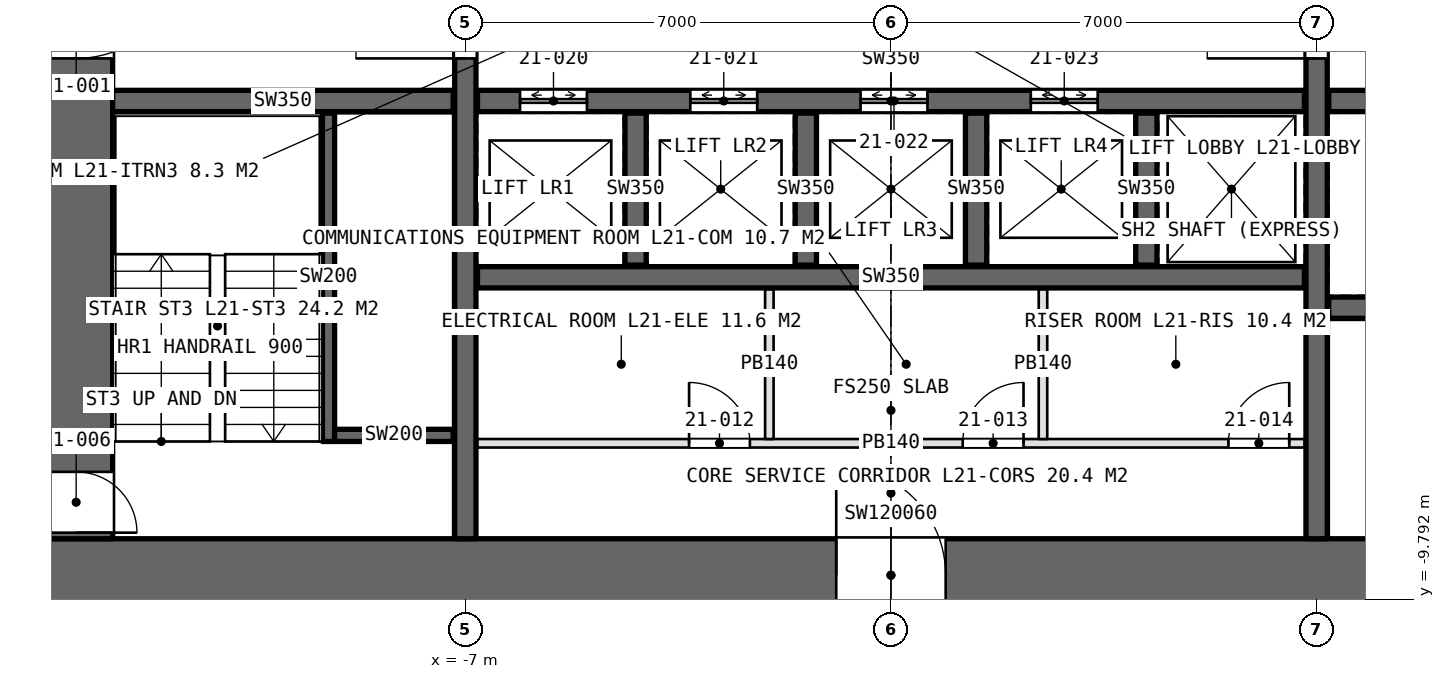
"""IFC4 building model, lengths in metres.
Left out: names, types, materials, properties, quantities, classifications, styles, units other than length and angle.
Written with IfcOpenShell. Run it as: python <this file> out.ifc"""

import sys

from ifc_helpers import new_model, si_unit, direction, frame, frame_2d, origin, place, context, subcontext, project, spatial, rectangle, extrude, element, fill, save


model = new_model("IFC4")
c1 = context("Model", 3, precision=1e-05, world=origin(), true_north=direction((0.0, 1.0)))
c2 = subcontext(c1, "Body", "Model", "MODEL_VIEW")
j1 = project(units=[si_unit("LENGTHUNIT", "METRE"), si_unit("PLANEANGLEUNIT", "RADIAN")], contexts=[c1])
p1 = place(None, origin())
s1 = spatial("IfcSite", under=j1, at=p1, CompositionType="ELEMENT")
p2 = place(p1, origin())
s2 = spatial("IfcBuilding", under=s1, at=p2, CompositionType="ELEMENT")
p3 = place(p2, frame((0.0, 0.0, 105.0)))
s3 = spatial("IfcBuildingStorey", under=s2, at=p3, CompositionType="ELEMENT", Elevation=105.0)
p4 = place(p3, frame((-14.0, -9.4, 0.0), z_axis=(0.0, 0.0, 1.0), x_axis=(1.0, 0.0, 0.0)))
e1 = element("IfcWall", 1, at=p4, inside=s3, PredefinedType="SHEAR", context=c2, shape_type="SweptSolid", body=[
    extrude(rectangle(XDim=28.0, YDim=1.2, at=frame_2d((14.0, 0.0))), origin(), (0.0, 0.0, 1.0), 4.2),
])
p5 = place(p4, frame((13.1, 0.0, 0.0)))
e2 = element("IfcOpeningElement", 2, at=p5, cuts=e1, PredefinedType="OPENING", context=c2, shape_type="SweptSolid", body=[
    extrude(rectangle(XDim=1.8, YDim=2.4, at=frame_2d((0.9, 1.2))), frame((0.0, 0.61, 0.0), z_axis=(0.0, -1.0, 0.0), x_axis=(1.0, 0.0, 0.0)), (0.0, 0.0, 1.0), 1.22),
])
p6 = place(p4, frame((22.9, 0.0, 0.0)))
e3 = element("IfcOpeningElement", 3, at=p6, cuts=e1, PredefinedType="OPENING", context=c2, shape_type="SweptSolid", body=[
    extrude(rectangle(XDim=2.2, YDim=2.7, at=frame_2d((1.1, 1.35))), frame((0.0, 0.61, 0.0), z_axis=(0.0, -1.0, 0.0), x_axis=(1.0, 0.0, 0.0)), (0.0, 0.0, 1.0), 1.22),
])
p7 = place(p3, frame((-13.4, 8.8, 0.0), z_axis=(0.0, 0.0, 1.0), x_axis=(0.0, -1.0, 0.0)))
e4 = element("IfcWall", 4, at=p7, inside=s3, PredefinedType="SHEAR", context=c2, shape_type="SweptSolid", body=[
    extrude(rectangle(XDim=17.6, YDim=1.2, at=frame_2d((8.8, 0.0))), origin(), (0.0, 0.0, 1.0), 4.2),
])
p8 = place(p7, frame((7.9, 0.0, 0.0)))
e5 = element("IfcOpeningElement", 5, at=p8, cuts=e4, PredefinedType="OPENING", context=c2, shape_type="SweptSolid", body=[
    extrude(rectangle(XDim=1.8, YDim=2.4, at=frame_2d((0.9, 1.2))), frame((0.0, 0.61, 0.0), z_axis=(0.0, -1.0, 0.0), x_axis=(1.0, 0.0, 0.0)), (0.0, 0.0, 1.0), 1.22),
])
p9 = place(p7, frame((16.5, 0.0, 0.0)))
e6 = element("IfcOpeningElement", 6, at=p9, cuts=e4, PredefinedType="OPENING", context=c2, shape_type="SweptSolid", body=[
    extrude(rectangle(XDim=1.0, YDim=2.4, at=frame_2d((0.5, 1.2))), frame((0.0, 0.61, 0.0), z_axis=(0.0, -1.0, 0.0), x_axis=(1.0, 0.0, 0.0)), (0.0, 0.0, 1.0), 1.22),
])
p10 = place(p3, frame((-7.0, -8.8, 0.0), z_axis=(0.0, 0.0, 1.0), x_axis=(0.0, 1.0, 0.0)))
e7 = element("IfcWall", 7, at=p10, inside=s3, PredefinedType="SHEAR", context=c2, shape_type="SweptSolid", body=[
    extrude(rectangle(XDim=17.6, YDim=0.35, at=frame_2d((8.8, 0.0))), origin(), (0.0, 0.0, 1.0), 4.2),
])
p11 = place(p10, frame((7.9, 0.0, 0.0)))
e8 = element("IfcOpeningElement", 8, at=p11, cuts=e7, PredefinedType="OPENING", context=c2, shape_type="SweptSolid", body=[
    extrude(rectangle(XDim=1.8, YDim=2.4, at=frame_2d((0.9, 1.2))), frame((0.0, 0.185, 0.0), z_axis=(0.0, -1.0, 0.0), x_axis=(1.0, 0.0, 0.0)), (0.0, 0.0, 1.0), 0.37),
])
p12 = place(p3, frame((7.0, -8.8, 0.0), z_axis=(0.0, 0.0, 1.0), x_axis=(0.0, 1.0, 0.0)))
e9 = element("IfcWall", 9, at=p12, inside=s3, PredefinedType="SHEAR", context=c2, shape_type="SweptSolid", body=[
    extrude(rectangle(XDim=17.6, YDim=0.35, at=frame_2d((8.8, 0.0))), origin(), (0.0, 0.0, 1.0), 4.2),
])
p13 = place(p12, frame((7.9, 0.0, 0.0)))
e10 = element("IfcOpeningElement", 10, at=p13, cuts=e9, PredefinedType="OPENING", context=c2, shape_type="SweptSolid", body=[
    extrude(rectangle(XDim=1.8, YDim=2.4, at=frame_2d((0.9, 1.2))), frame((0.0, 0.185, 0.0), z_axis=(0.0, -1.0, 0.0), x_axis=(1.0, 0.0, 0.0)), (0.0, 0.0, 1.0), 0.37),
])
p14 = place(p3, frame((-6.8, -1.6, 0.0), z_axis=(0.0, 0.0, 1.0), x_axis=(1.0, 0.0, 0.0)))
e11 = element("IfcWall", 11, at=p14, inside=s3, PredefinedType="SHEAR", context=c2, shape_type="SweptSolid", body=[
    extrude(rectangle(XDim=13.6, YDim=0.35, at=frame_2d((6.8, 0.0))), origin(), (0.0, 0.0, 1.0), 4.2),
])
p15 = place(p14, frame((0.7, 0.0, 0.0)))
e12 = element("IfcOpeningElement", 12, at=p15, cuts=e11, PredefinedType="OPENING", context=c2, shape_type="SweptSolid", body=[
    extrude(rectangle(XDim=1.1, YDim=2.4, at=frame_2d((0.55, 1.2))), frame((0.0, 0.185, 0.0), z_axis=(0.0, -1.0, 0.0), x_axis=(1.0, 0.0, 0.0)), (0.0, 0.0, 1.0), 0.37),
])
p16 = place(p14, frame((3.5, 0.0, 0.0)))
e13 = element("IfcOpeningElement", 13, at=p16, cuts=e11, PredefinedType="OPENING", context=c2, shape_type="SweptSolid", body=[
    extrude(rectangle(XDim=1.1, YDim=2.4, at=frame_2d((0.55, 1.2))), frame((0.0, 0.185, 0.0), z_axis=(0.0, -1.0, 0.0), x_axis=(1.0, 0.0, 0.0)), (0.0, 0.0, 1.0), 0.37),
])
p17 = place(p14, frame((6.3, 0.0, 0.0)))
e14 = element("IfcOpeningElement", 14, at=p17, cuts=e11, PredefinedType="OPENING", context=c2, shape_type="SweptSolid", body=[
    extrude(rectangle(XDim=1.1, YDim=2.4, at=frame_2d((0.55, 1.2))), frame((0.0, 0.185, 0.0), z_axis=(0.0, -1.0, 0.0), x_axis=(1.0, 0.0, 0.0)), (0.0, 0.0, 1.0), 0.37),
])
p18 = place(p14, frame((9.1, 0.0, 0.0)))
e15 = element("IfcOpeningElement", 15, at=p18, cuts=e11, PredefinedType="OPENING", context=c2, shape_type="SweptSolid", body=[
    extrude(rectangle(XDim=1.1, YDim=2.4, at=frame_2d((0.55, 1.2))), frame((0.0, 0.185, 0.0), z_axis=(0.0, -1.0, 0.0), x_axis=(1.0, 0.0, 0.0)), (0.0, 0.0, 1.0), 0.37),
])
p19 = place(p3, frame((-6.8, -4.5, 0.0), z_axis=(0.0, 0.0, 1.0), x_axis=(1.0, 0.0, 0.0)))
e16 = element("IfcWall", 16, at=p19, inside=s3, PredefinedType="SHEAR", context=c2, shape_type="SweptSolid", body=[
    extrude(rectangle(XDim=13.6, YDim=0.35, at=frame_2d((6.8, 0.0))), origin(), (0.0, 0.0, 1.0), 4.2),
])
p20 = place(p3, frame((-12.8, -1.6, 0.0), z_axis=(0.0, 0.0, 1.0), x_axis=(1.0, 0.0, 0.0)))
e17 = element("IfcWall", 17, at=p20, inside=s3, PredefinedType="SHEAR", context=c2, shape_type="SweptSolid", body=[
    extrude(rectangle(XDim=5.6, YDim=0.35, at=frame_2d((2.8, 0.0))), origin(), (0.0, 0.0, 1.0), 4.2),
])
p21 = place(p3, frame((7.2, -1.6, 0.0), z_axis=(0.0, 0.0, 1.0), x_axis=(1.0, 0.0, 0.0)))
e18 = element("IfcWall", 18, at=p21, inside=s3, PredefinedType="SHEAR", context=c2, shape_type="SweptSolid", body=[
    extrude(rectangle(XDim=5.6, YDim=0.35, at=frame_2d((2.8, 0.0))), origin(), (0.0, 0.0, 1.0), 4.2),
])
p22 = place(p21, frame((0.9, 0.0, 0.0)))
e19 = element("IfcOpeningElement", 19, at=p22, cuts=e18, PredefinedType="OPENING", context=c2, shape_type="SweptSolid", body=[
    extrude(rectangle(XDim=1.3, YDim=2.4, at=frame_2d((0.65, 1.2))), frame((0.0, 0.185, 0.0), z_axis=(0.0, -1.0, 0.0), x_axis=(1.0, 0.0, 0.0)), (0.0, 0.0, 1.0), 0.37),
])
p23 = place(p21, frame((3.9, 0.0, 0.0)))
e20 = element("IfcOpeningElement", 20, at=p23, cuts=e18, PredefinedType="OPENING", context=c2, shape_type="SweptSolid", body=[
    extrude(rectangle(XDim=1.3, YDim=2.4, at=frame_2d((0.65, 1.2))), frame((0.0, 0.185, 0.0), z_axis=(0.0, -1.0, 0.0), x_axis=(1.0, 0.0, 0.0)), (0.0, 0.0, 1.0), 0.37),
])
p24 = place(p3, frame((7.2, -5.0, 0.0), z_axis=(0.0, 0.0, 1.0), x_axis=(1.0, 0.0, 0.0)))
e21 = element("IfcWall", 21, at=p24, inside=s3, PredefinedType="SHEAR", context=c2, shape_type="SweptSolid", body=[
    extrude(rectangle(XDim=5.6, YDim=0.35, at=frame_2d((2.8, 0.0))), origin(), (0.0, 0.0, 1.0), 4.2),
])
for number, where, z_axis, x_axis in (
    (22, (-4.2, -4.3, 0.0), (0.0, 0.0, 1.0), (0.0, 1.0, 0.0)),
    (23, (-1.4, -4.3, 0.0), (0.0, 0.0, 1.0), (0.0, 1.0, 0.0)),
    (24, (1.4, -4.3, 0.0), (0.0, 0.0, 1.0), (0.0, 1.0, 0.0)),
    (25, (4.2, -4.3, 0.0), (0.0, 0.0, 1.0), (0.0, 1.0, 0.0)),
):
    element("IfcWall", number, at=place(p3, frame(where, z_axis=z_axis, x_axis=x_axis)), inside=s3, PredefinedType="SHEAR", context=c2, shape_type="SweptSolid", body=[
        extrude(rectangle(XDim=2.5, YDim=0.35, at=frame_2d((1.25, 0.0))), origin(), (0.0, 0.0, 1.0), 4.2),
    ])
p25 = place(p3, frame((-6.8, -7.23, 0.0), z_axis=(0.0, 0.0, 1.0), x_axis=(1.0, 0.0, 0.0)))
e26 = element("IfcWall", 26, at=p25, inside=s3, PredefinedType="PARTITIONING", context=c2, shape_type="SweptSolid", body=[
    extrude(rectangle(XDim=13.6, YDim=0.14, at=frame_2d((6.8, 0.0))), origin(), (0.0, 0.0, 1.0), 3.95),
])
p26 = place(p25, frame((3.48, 0.0, 0.0)))
e27 = element("IfcOpeningElement", 27, at=p26, cuts=e26, PredefinedType="OPENING", context=c2, shape_type="SweptSolid", body=[
    extrude(rectangle(XDim=1.0, YDim=2.4, at=frame_2d((0.5, 1.2))), frame((0.0, 0.08, 0.0), z_axis=(0.0, -1.0, 0.0), x_axis=(1.0, 0.0, 0.0)), (0.0, 0.0, 1.0), 0.16),
])
p27 = place(p25, frame((7.98, 0.0, 0.0)))
e28 = element("IfcOpeningElement", 28, at=p27, cuts=e26, PredefinedType="OPENING", context=c2, shape_type="SweptSolid", body=[
    extrude(rectangle(XDim=1.0, YDim=2.4, at=frame_2d((0.5, 1.2))), frame((0.0, 0.08, 0.0), z_axis=(0.0, -1.0, 0.0), x_axis=(1.0, 0.0, 0.0)), (0.0, 0.0, 1.0), 0.16),
])
p28 = place(p25, frame((12.35, 0.0, 0.0)))
e29 = element("IfcOpeningElement", 29, at=p28, cuts=e26, PredefinedType="OPENING", context=c2, shape_type="SweptSolid", body=[
    extrude(rectangle(XDim=1.0, YDim=2.4, at=frame_2d((0.5, 1.2))), frame((0.0, 0.08, 0.0), z_axis=(0.0, -1.0, 0.0), x_axis=(1.0, 0.0, 0.0)), (0.0, 0.0, 1.0), 0.16),
])
for number, where, z_axis, x_axis in (
    (30, (-2.0, -4.7, 0.0), (0.0, 0.0, 1.0), (0.0, -1.0, 0.0)),
    (31, (2.5, -4.7, 0.0), (0.0, 0.0, 1.0), (0.0, -1.0, 0.0)),
):
    element("IfcWall", number, at=place(p3, frame(where, z_axis=z_axis, x_axis=x_axis)), inside=s3, PredefinedType="PARTITIONING", context=c2, shape_type="SweptSolid", body=[
        extrude(rectangle(XDim=2.46, YDim=0.14, at=frame_2d((1.23, 0.0))), origin(), (0.0, 0.0, 1.0), 3.95),
    ])
p29 = place(p3, frame((-9.25, -7.2, 0.0), z_axis=(0.0, 0.0, 1.0), x_axis=(0.0, 1.0, 0.0)))
e32 = element("IfcWall", 32, at=p29, inside=s3, PredefinedType="SOLIDWALL", context=c2, shape_type="SweptSolid", body=[
    extrude(rectangle(XDim=5.4, YDim=0.2, at=frame_2d((2.7, 0.0))), origin(), (0.0, 0.0, 1.0), 4.2),
])
p30 = place(p3, frame((-9.15, -7.1, 0.0), z_axis=(0.0, 0.0, 1.0), x_axis=(1.0, 0.0, 0.0)))
e33 = element("IfcWall", 33, at=p30, inside=s3, PredefinedType="SOLIDWALL", context=c2, shape_type="SweptSolid", body=[
    extrude(rectangle(XDim=1.95, YDim=0.2, at=frame_2d((0.975, 0.0))), origin(), (0.0, 0.0, 1.0), 4.2),
])
p31 = place(p8, origin())
e34 = element("IfcDoor", 34, at=p31, inside=s3, OperationType="DOUBLE_DOOR_SINGLE_SWING", PredefinedType="DOOR", context=c2, shape_type="SweptSolid", body=[
    extrude(rectangle(XDim=1.8, YDim=2.4, at=frame_2d((0.9, 1.2))), frame((0.0, 0.025, 0.0), z_axis=(0.0, -1.0, 0.0), x_axis=(1.0, 0.0, 0.0)), (0.0, 0.0, 1.0), 0.05),
])
fill(e5, e34)
p32 = place(p11, origin())
e35 = element("IfcDoor", 35, at=p32, inside=s3, OperationType="DOUBLE_DOOR_SINGLE_SWING", PredefinedType="DOOR", context=c2, shape_type="SweptSolid", body=[
    extrude(rectangle(XDim=1.8, YDim=2.4, at=frame_2d((0.9, 1.2))), frame((0.0, 0.025, 0.0), z_axis=(0.0, -1.0, 0.0), x_axis=(1.0, 0.0, 0.0)), (0.0, 0.0, 1.0), 0.05),
])
fill(e8, e35)
p33 = place(p13, origin())
e36 = element("IfcDoor", 36, at=p33, inside=s3, OperationType="DOUBLE_DOOR_SINGLE_SWING", PredefinedType="DOOR", context=c2, shape_type="SweptSolid", body=[
    extrude(rectangle(XDim=1.8, YDim=2.4, at=frame_2d((0.9, 1.2))), frame((0.0, 0.025, 0.0), z_axis=(0.0, -1.0, 0.0), x_axis=(1.0, 0.0, 0.0)), (0.0, 0.0, 1.0), 0.05),
])
fill(e10, e36)
p34 = place(p9, origin())
e37 = element("IfcDoor", 37, at=p34, inside=s3, OperationType="SINGLE_SWING_RIGHT", PredefinedType="DOOR", context=c2, shape_type="SweptSolid", body=[
    extrude(rectangle(XDim=1.0, YDim=2.4, at=frame_2d((0.5, 1.2))), frame((0.0, 0.025, 0.0), z_axis=(0.0, -1.0, 0.0), x_axis=(1.0, 0.0, 0.0)), (0.0, 0.0, 1.0), 0.05),
])
fill(e6, e37)
p35 = place(p26, origin())
e38 = element("IfcDoor", 38, at=p35, inside=s3, OperationType="SINGLE_SWING_LEFT", PredefinedType="DOOR", context=c2, shape_type="SweptSolid", body=[
    extrude(rectangle(XDim=1.0, YDim=2.4, at=frame_2d((0.5, 1.2))), frame((0.0, 0.025, 0.0), z_axis=(0.0, -1.0, 0.0), x_axis=(1.0, 0.0, 0.0)), (0.0, 0.0, 1.0), 0.05),
])
fill(e27, e38)
p36 = place(p27, origin())
e39 = element("IfcDoor", 39, at=p36, inside=s3, OperationType="SINGLE_SWING_RIGHT", PredefinedType="DOOR", context=c2, shape_type="SweptSolid", body=[
    extrude(rectangle(XDim=1.0, YDim=2.4, at=frame_2d((0.5, 1.2))), frame((0.0, 0.025, 0.0), z_axis=(0.0, -1.0, 0.0), x_axis=(1.0, 0.0, 0.0)), (0.0, 0.0, 1.0), 0.05),
])
fill(e28, e39)
p37 = place(p28, origin())
e40 = element("IfcDoor", 40, at=p37, inside=s3, OperationType="SINGLE_SWING_RIGHT", PredefinedType="DOOR", context=c2, shape_type="SweptSolid", body=[
    extrude(rectangle(XDim=1.0, YDim=2.4, at=frame_2d((0.5, 1.2))), frame((0.0, 0.025, 0.0), z_axis=(0.0, -1.0, 0.0), x_axis=(1.0, 0.0, 0.0)), (0.0, 0.0, 1.0), 0.05),
])
fill(e29, e40)
p38 = place(p5, origin())
e41 = element("IfcDoor", 41, at=p38, inside=s3, OperationType="DOUBLE_DOOR_SINGLE_SWING", PredefinedType="DOOR", context=c2, shape_type="SweptSolid", body=[
    extrude(rectangle(XDim=1.8, YDim=2.4, at=frame_2d((0.9, 1.2))), frame((0.0, 0.025, 0.0), z_axis=(0.0, -1.0, 0.0), x_axis=(1.0, 0.0, 0.0)), (0.0, 0.0, 1.0), 0.05),
])
fill(e2, e41)
p39 = place(p15, origin())
e42 = element("IfcDoor", 42, at=p39, inside=s3, OperationType="DOUBLE_DOOR_SLIDING", PredefinedType="DOOR", context=c2, shape_type="SweptSolid", body=[
    extrude(rectangle(XDim=1.1, YDim=2.4, at=frame_2d((0.55, 1.2))), frame((0.0, 0.025, 0.0), z_axis=(0.0, -1.0, 0.0), x_axis=(1.0, 0.0, 0.0)), (0.0, 0.0, 1.0), 0.05),
])
fill(e12, e42)
p40 = place(p16, origin())
e43 = element("IfcDoor", 43, at=p40, inside=s3, OperationType="DOUBLE_DOOR_SLIDING", PredefinedType="DOOR", context=c2, shape_type="SweptSolid", body=[
    extrude(rectangle(XDim=1.1, YDim=2.4, at=frame_2d((0.55, 1.2))), frame((0.0, 0.025, 0.0), z_axis=(0.0, -1.0, 0.0), x_axis=(1.0, 0.0, 0.0)), (0.0, 0.0, 1.0), 0.05),
])
fill(e13, e43)
p41 = place(p17, origin())
e44 = element("IfcDoor", 44, at=p41, inside=s3, OperationType="DOUBLE_DOOR_SLIDING", PredefinedType="DOOR", context=c2, shape_type="SweptSolid", body=[
    extrude(rectangle(XDim=1.1, YDim=2.4, at=frame_2d((0.55, 1.2))), frame((0.0, 0.025, 0.0), z_axis=(0.0, -1.0, 0.0), x_axis=(1.0, 0.0, 0.0)), (0.0, 0.0, 1.0), 0.05),
])
fill(e14, e44)
p42 = place(p18, origin())
e45 = element("IfcDoor", 45, at=p42, inside=s3, OperationType="DOUBLE_DOOR_SLIDING", PredefinedType="DOOR", context=c2, shape_type="SweptSolid", body=[
    extrude(rectangle(XDim=1.1, YDim=2.4, at=frame_2d((0.55, 1.2))), frame((0.0, 0.025, 0.0), z_axis=(0.0, -1.0, 0.0), x_axis=(1.0, 0.0, 0.0)), (0.0, 0.0, 1.0), 0.05),
])
fill(e15, e45)
save(model, sys.argv[1])
